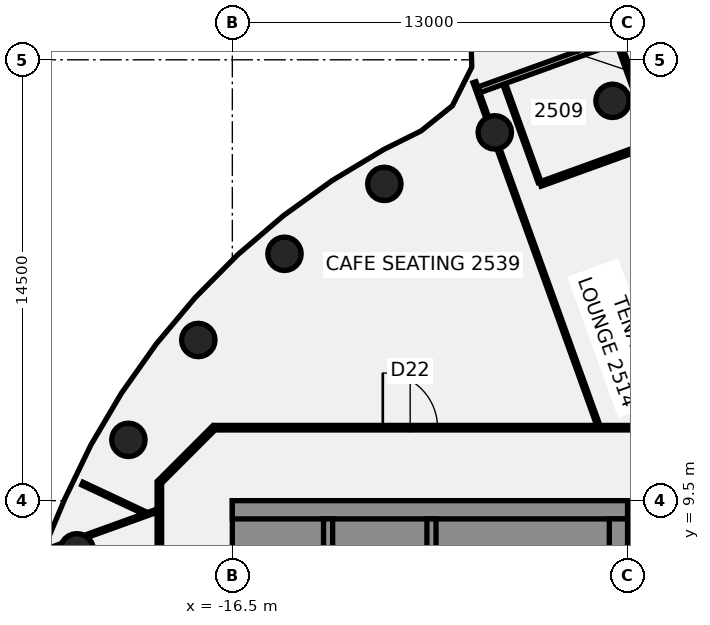
"""IFC4 building model, lengths in metres.
Left out: names, types, materials, properties, quantities, classifications, styles, units other than length and angle.
Written with IfcOpenShell. Run it as: python <this file> out.ifc"""

import sys

from ifc_helpers import new_model, si_unit, direction, frame, frame_2d, origin, origin_2d, place, context, subcontext, project, spatial, polyline, rectangle, circle, outline, extrude, element, fill, save


model = new_model("IFC4")
c1 = context("Model", 3, precision=1e-05, world=origin(), true_north=direction((0.0, 1.0)))
c2 = subcontext(c1, "Body", "Model", "MODEL_VIEW")
j1 = project(units=[si_unit("LENGTHUNIT", "METRE"), si_unit("PLANEANGLEUNIT", "RADIAN")], contexts=[c1])
p1 = place(None, origin())
s1 = spatial("IfcSite", under=j1, at=p1, CompositionType="ELEMENT")
p2 = place(p1, origin())
s2 = spatial("IfcBuilding", under=s1, at=p2, CompositionType="ELEMENT")
p3 = place(p2, frame((0.0, 0.0, 106.0)))
s3 = spatial("IfcBuildingStorey", under=s2, at=p3, CompositionType="ELEMENT", Elevation=106.0)
for number, where, z_axis, x_axis in (
    (1, (-3.994, 22.651, -0.14), (0.0, 0.0, 1.0), (1.0, 0.0, 0.0)),
    (2, (-7.866, 21.613, -0.14), (0.0, 0.0, 1.0), (1.0, 0.0, 0.0)),
    (3, (-11.5, 19.919, -0.14), (0.0, 0.0, 1.0), (1.0, 0.0, 0.0)),
    (4, (-14.784, 17.619, -0.14), (0.0, 0.0, 1.0), (1.0, 0.0, 0.0)),
    (5, (-17.619, 14.784, -0.14), (0.0, 0.0, 1.0), (1.0, 0.0, 0.0)),
    (6, (-19.919, 11.5, -0.14), (0.0, 0.0, 1.0), (1.0, 0.0, 0.0)),
    (7, (-21.613, 7.866, -0.14), (0.0, 0.0, 1.0), (1.0, 0.0, 0.0)),
):
    element("IfcColumn", number, at=place(p3, frame(where, z_axis=z_axis, x_axis=x_axis)), inside=s3, PredefinedType="COLUMN", context=c2, shape_type="SweptSolid", body=[
        extrude(circle(Radius=0.55, at=origin_2d()), origin(), (0.0, 0.0, 1.0), 3.75),
    ])
p4 = place(p3, frame((-8.536, 23.263, 0.0), z_axis=(0.0, 0.0, 1.0), x_axis=(0.339464068385, -0.940619022918, 0.0)))
e8 = element("IfcWall", 8, at=p4, inside=s3, PredefinedType="PARTITIONING", context=c2, shape_type="SweptSolid", body=[
    extrude(rectangle(XDim=1.23, YDim=0.1, at=frame_2d((0.615, 0.0))), origin(), (0.0, 0.0, 1.0), 3.01),
])
p5 = place(p3, frame((-7.749, 21.084, 0.0), z_axis=(0.0, 0.0, 1.0), x_axis=(0.339523661118, -0.940597514105, 0.0)))
e9 = element("IfcWall", 9, at=p5, inside=s3, PredefinedType="PARTITIONING", context=c2, shape_type="SweptSolid", body=[
    extrude(rectangle(XDim=9.684, YDim=0.1, at=frame_2d((4.842, 0.0))), origin(), (0.0, 0.0, 1.0), 3.01),
])
p6 = place(p3, frame((-7.558, 23.205, 0.0), z_axis=(0.0, 0.0, 1.0), x_axis=(0.339464028475, -0.940619037322, 0.0)))
e10 = element("IfcWall", 10, at=p6, inside=s3, PredefinedType="PARTITIONING", context=c2, shape_type="SweptSolid", body=[
    extrude(rectangle(XDim=3.425, YDim=0.1, at=frame_2d((1.712, 0.0))), origin(), (0.0, 0.0, 1.0), 3.01),
])
p7 = place(p3, frame((-5.449, 33.562, 0.0), z_axis=(0.0, 0.0, 1.0), x_axis=(0.339564331491, -0.940582832492, 0.0)))
e11 = element("IfcWall", 11, at=p7, inside=s3, PredefinedType="PARTITIONING", context=c2, shape_type="SweptSolid", body=[
    extrude(rectangle(XDim=11.305, YDim=0.15, at=frame_2d((5.653, 0.0))), origin(), (0.0, 0.0, 1.0), 3.01),
])
p8 = place(p7, frame((9.375, 0.0, 0.0)))
e12 = element("IfcOpeningElement", 12, at=p8, cuts=e11, PredefinedType="OPENING", context=c2, shape_type="SweptSolid", body=[
    extrude(rectangle(XDim=1.0, YDim=2.1, at=frame_2d((0.5, 1.05))), frame((0.0, 0.085, 0.0), z_axis=(0.0, -1.0, 0.0), x_axis=(1.0, 0.0, 0.0)), (0.0, 0.0, 1.0), 0.17),
])
p9 = place(p7, frame((5.175, 0.0, 0.0)))
e13 = element("IfcOpeningElement", 13, at=p9, cuts=e11, PredefinedType="OPENING", context=c2, shape_type="SweptSolid", body=[
    extrude(rectangle(XDim=0.9, YDim=2.1, at=frame_2d((0.45, 1.05))), frame((0.0, 0.085, 0.0), z_axis=(0.0, -1.0, 0.0), x_axis=(1.0, 0.0, 0.0)), (0.0, 0.0, 1.0), 0.17),
])
p10 = place(p3, frame((-3.796, 24.563, 0.0), z_axis=(0.0, 0.0, 1.0), x_axis=(0.339653221819, -0.94055073702, 0.0)))
e14 = element("IfcWall", 14, at=p10, inside=s3, PredefinedType="PARTITIONING", context=c2, shape_type="SweptSolid", body=[
    extrude(rectangle(XDim=3.425, YDim=0.15, at=frame_2d((1.712, 0.0))), origin(), (0.0, 0.0, 1.0), 3.01),
])
p11 = place(p10, frame((2.45, 0.0, 0.0)))
e15 = element("IfcOpeningElement", 15, at=p11, cuts=e14, PredefinedType="OPENING", context=c2, shape_type="SweptSolid", body=[
    extrude(rectangle(XDim=0.9, YDim=2.1, at=frame_2d((0.45, 1.05))), frame((0.0, 0.085, 0.0), z_axis=(0.0, -1.0, 0.0), x_axis=(1.0, 0.0, 0.0)), (0.0, 0.0, 1.0), 0.17),
])
p12 = place(p3, frame((-21.432, 10.061, 0.0), z_axis=(0.0, 0.0, 1.0), x_axis=(0.905202217212, -0.424981112467, 0.0)))
e16 = element("IfcWall", 16, at=p12, inside=s3, PredefinedType="PARTITIONING", context=c2, shape_type="SweptSolid", body=[
    extrude(rectangle(XDim=2.263, YDim=0.1, at=frame_2d((1.131, 0.0))), origin(), (0.0, 0.0, 1.0), 3.01),
])
p13 = place(p3, frame((-17.065, 11.9, 0.0), z_axis=(0.0, 0.0, 1.0), x_axis=(1.0, 0.0, 0.0)))
e17 = element("IfcWall", 17, at=p13, inside=s3, PredefinedType="PARTITIONING", context=c2, shape_type="SweptSolid", body=[
    extrude(rectangle(XDim=34.165, YDim=0.15, at=frame_2d((17.083, 0.0))), origin(), (0.0, 0.0, 1.0), 3.01),
])
p14 = place(p13, frame((19.797, 0.0, 0.0)))
e18 = element("IfcOpeningElement", 18, at=p14, cuts=e17, PredefinedType="OPENING", context=c2, shape_type="SweptSolid", body=[
    extrude(rectangle(XDim=1.8, YDim=2.1, at=frame_2d((0.9, 1.05))), frame((0.0, 0.085, 0.0), z_axis=(0.0, -1.0, 0.0), x_axis=(1.0, 0.0, 0.0)), (0.0, 0.0, 1.0), 0.17),
])
p15 = place(p13, frame((29.992, 0.0, 0.0)))
e19 = element("IfcOpeningElement", 19, at=p15, cuts=e17, PredefinedType="OPENING", context=c2, shape_type="SweptSolid", body=[
    extrude(rectangle(XDim=1.8, YDim=2.1, at=frame_2d((0.9, 1.05))), frame((0.0, 0.085, 0.0), z_axis=(0.0, -1.0, 0.0), x_axis=(1.0, 0.0, 0.0)), (0.0, 0.0, 1.0), 0.17),
])
p16 = place(p13, frame((5.515, 0.0, 0.0)))
e20 = element("IfcOpeningElement", 20, at=p16, cuts=e17, PredefinedType="OPENING", context=c2, shape_type="SweptSolid", body=[
    extrude(rectangle(XDim=1.8, YDim=2.1, at=frame_2d((0.9, 1.05))), frame((0.0, 0.085, 0.0), z_axis=(0.0, -1.0, 0.0), x_axis=(1.0, 0.0, 0.0)), (0.0, 0.0, 1.0), 0.17),
])
p17 = place(p3, frame((-22.415, 7.93, 0.0), z_axis=(0.0, 0.0, 1.0), x_axis=(0.940447136325, 0.339939970845, 0.0)))
e21 = element("IfcWall", 21, at=p17, inside=s3, PredefinedType="PARTITIONING", context=c2, shape_type="SweptSolid", body=[
    extrude(rectangle(XDim=0.304, YDim=0.1, at=frame_2d((0.152, 0.0))), origin(), (0.0, 0.0, 1.0), 3.01),
])
p18 = place(p3, frame((-21.31, 8.329, 0.0), z_axis=(0.0, 0.0, 1.0), x_axis=(0.94058618195, 0.339555053452, 0.0)))
e22 = element("IfcWall", 22, at=p18, inside=s3, PredefinedType="PARTITIONING", context=c2, shape_type="SweptSolid", body=[
    extrude(rectangle(XDim=2.483, YDim=0.1, at=frame_2d((1.241, 0.0))), origin(), (0.0, 0.0, 1.0), 3.01),
])
p19 = place(p3, frame((-8.387, 23.012, 0.0), z_axis=(0.0, 0.0, 1.0), x_axis=(0.94050598111, 0.339777132096, 0.0)))
e23 = element("IfcWall", 23, at=p19, inside=s3, PredefinedType="PARTITIONING", context=c2, shape_type="SweptSolid", body=[
    extrude(rectangle(XDim=14.244, YDim=0.2, at=frame_2d((7.122, 0.0))), origin(), (0.0, 0.0, 1.0), 3.01),
])
p20 = place(p19, frame((6.946, 0.0, 0.0)))
e24 = element("IfcOpeningElement", 24, at=p20, cuts=e23, PredefinedType="OPENING", context=c2, shape_type="SweptSolid", body=[
    extrude(rectangle(XDim=1.4, YDim=2.1, at=frame_2d((0.7, 1.05))), frame((0.0, 0.11, 0.0), z_axis=(0.0, -1.0, 0.0), x_axis=(1.0, 0.0, 0.0)), (0.0, 0.0, 1.0), 0.22),
])
p21 = place(p3, frame((-6.37, 19.913, 0.0), z_axis=(0.0, 0.0, 1.0), x_axis=(0.940654582455, 0.339365520503, 0.0)))
e25 = element("IfcWall", 25, at=p21, inside=s3, PredefinedType="PARTITIONING", context=c2, shape_type="SweptSolid", body=[
    extrude(rectangle(XDim=4.0, YDim=0.15, at=frame_2d((2.0, 0.0))), origin(), (0.0, 0.0, 1.0), 3.01),
])
p22 = place(p3, frame((-18.872, 10.128, 0.0), z_axis=(0.0, 0.0, 1.0), x_axis=(0.707106781187, 0.707106781187, 0.0)))
e26 = element("IfcWall", 26, at=p22, inside=s3, PredefinedType="PARTITIONING", context=c2, shape_type="SweptSolid", body=[
    extrude(rectangle(XDim=2.505, YDim=0.15, at=frame_2d((1.253, 0.0))), origin(), (0.0, 0.0, 1.0), 3.01),
])
p23 = place(p3, frame((-18.9, -10.1, 0.0), z_axis=(0.0, 0.0, 1.0), x_axis=(0.0, 1.0, 0.0)))
e27 = element("IfcWall", 27, at=p23, inside=s3, PredefinedType="PARTITIONING", context=c2, shape_type="SweptSolid", body=[
    extrude(rectangle(XDim=20.2, YDim=0.15, at=frame_2d((10.1, 0.0))), origin(), (0.0, 0.0, 1.0), 3.01),
])
p24 = place(p23, frame((9.554, 0.0, 0.0)))
e28 = element("IfcOpeningElement", 28, at=p24, cuts=e27, PredefinedType="OPENING", context=c2, shape_type="SweptSolid", body=[
    extrude(rectangle(XDim=1.8, YDim=2.1, at=frame_2d((0.9, 1.05))), frame((0.0, 0.085, 0.0), z_axis=(0.0, -1.0, 0.0), x_axis=(1.0, 0.0, 0.0)), (0.0, 0.0, 1.0), 0.17),
])
p25 = place(p23, frame((5.389, 0.0, 0.0)))
e29 = element("IfcOpeningElement", 29, at=p25, cuts=e27, PredefinedType="OPENING", context=c2, shape_type="SweptSolid", body=[
    extrude(rectangle(XDim=0.9, YDim=2.1, at=frame_2d((0.45, 1.05))), frame((0.0, 0.085, 0.0), z_axis=(0.0, -1.0, 0.0), x_axis=(1.0, 0.0, 0.0)), (0.0, 0.0, 1.0), 0.17),
])
p26 = place(p3, origin())
e30 = element("IfcWall", 30, at=p26, inside=s3, PredefinedType="SHEAR", context=c2, shape_type="SweptSolid", body=[
    extrude(outline(polyline([(-13.5, -8.9), (-13.5, -8.125), (-15.9, -8.125), (-15.9, -5.625), (-13.5, -5.625), (-13.5, -5.375), (-15.9, -5.375), (-15.9, -2.875), (-13.5, -2.875), (-13.5, -2.625), (-15.9, -2.625), (-15.9, -0.125), (-13.5, -0.125), (-13.5, 0.125), (-15.9, 0.125), (-15.9, 2.625), (-13.5, 2.625), (-13.5, 2.875), (-15.9, 2.875), (-15.9, 5.375), (-13.5, 5.375), (-13.5, 5.625), (-15.9, 5.625), (-15.9, 8.125), (-13.5, 8.125), (-13.5, 8.9), (-15.9, 8.9), (-16.5, 8.9), (-16.5, -8.9), (-15.9, -8.9), (-13.5, -8.9)])), origin(), (0.0, 0.0, 1.0), 3.61),
])
p27 = place(p3, frame((-16.5, 9.2, 0.0), z_axis=(0.0, 0.0, 1.0), x_axis=(1.0, 0.0, 0.0)))
e31 = element("IfcWall", 31, at=p27, inside=s3, PredefinedType="SHEAR", context=c2, shape_type="SweptSolid", body=[
    extrude(rectangle(XDim=13.0, YDim=0.6, at=frame_2d((6.5, 0.0))), origin(), (0.0, 0.0, 1.0), 3.61),
])
p28 = place(p3, origin())
e32 = element("IfcWall", 32, at=p28, inside=s3, PredefinedType="SHEAR", context=c2, shape_type="SweptSolid", body=[
    extrude(outline(polyline([(-9.8, -5.375), (-9.8, -5.625), (-7.5, -5.625), (-7.2, -5.625), (-7.2, 8.9), (-7.5, 8.9), (-9.8, 8.9), (-9.8, 8.125), (-7.5, 8.125), (-7.5, 5.625), (-9.8, 5.625), (-9.8, 5.375), (-7.5, 5.375), (-7.5, 2.875), (-9.8, 2.875), (-9.8, 2.625), (-7.5, 2.625), (-7.5, 0.125), (-9.8, 0.125), (-9.8, -0.125), (-7.5, -0.125), (-7.5, -2.625), (-9.8, -2.625), (-9.8, -2.875), (-7.5, -2.875), (-7.5, -5.375), (-9.8, -5.375)])), origin(), (0.0, 0.0, 1.0), 3.61),
])
p29 = place(p3, frame((-13.35, -8.9, 0.0), z_axis=(0.0, 0.0, 1.0), x_axis=(0.0, 1.0, 0.0)))
e33 = element("IfcWall", 33, at=p29, inside=s3, PredefinedType="SHEAR", context=c2, shape_type="SweptSolid", body=[
    extrude(rectangle(XDim=17.8, YDim=0.3, at=frame_2d((8.9, 0.0))), origin(), (0.0, 0.0, 1.0), 3.61),
])
p30 = place(p29, frame((1.325, 0.0, 0.0)))
e34 = element("IfcOpeningElement", 34, at=p30, cuts=e33, PredefinedType="OPENING", context=c2, shape_type="SweptSolid", body=[
    extrude(rectangle(XDim=1.4, YDim=2.1, at=frame_2d((0.7, 1.05))), frame((0.0, 0.16, 0.0), z_axis=(0.0, -1.0, 0.0), x_axis=(1.0, 0.0, 0.0)), (0.0, 0.0, 1.0), 0.32),
])
p31 = place(p29, frame((4.225, 0.0, 0.0)))
e35 = element("IfcOpeningElement", 35, at=p31, cuts=e33, PredefinedType="OPENING", context=c2, shape_type="SweptSolid", body=[
    extrude(rectangle(XDim=1.1, YDim=2.1, at=frame_2d((0.55, 1.05))), frame((0.0, 0.16, 0.0), z_axis=(0.0, -1.0, 0.0), x_axis=(1.0, 0.0, 0.0)), (0.0, 0.0, 1.0), 0.32),
])
p32 = place(p29, frame((6.975, 0.0, 0.0)))
e36 = element("IfcOpeningElement", 36, at=p32, cuts=e33, PredefinedType="OPENING", context=c2, shape_type="SweptSolid", body=[
    extrude(rectangle(XDim=1.1, YDim=2.1, at=frame_2d((0.55, 1.05))), frame((0.0, 0.16, 0.0), z_axis=(0.0, -1.0, 0.0), x_axis=(1.0, 0.0, 0.0)), (0.0, 0.0, 1.0), 0.32),
])
p33 = place(p29, frame((9.725, 0.0, 0.0)))
e37 = element("IfcOpeningElement", 37, at=p33, cuts=e33, PredefinedType="OPENING", context=c2, shape_type="SweptSolid", body=[
    extrude(rectangle(XDim=1.1, YDim=2.1, at=frame_2d((0.55, 1.05))), frame((0.0, 0.16, 0.0), z_axis=(0.0, -1.0, 0.0), x_axis=(1.0, 0.0, 0.0)), (0.0, 0.0, 1.0), 0.32),
])
p34 = place(p29, frame((12.475, 0.0, 0.0)))
e38 = element("IfcOpeningElement", 38, at=p34, cuts=e33, PredefinedType="OPENING", context=c2, shape_type="SweptSolid", body=[
    extrude(rectangle(XDim=1.1, YDim=2.1, at=frame_2d((0.55, 1.05))), frame((0.0, 0.16, 0.0), z_axis=(0.0, -1.0, 0.0), x_axis=(1.0, 0.0, 0.0)), (0.0, 0.0, 1.0), 0.32),
])
p35 = place(p3, frame((-9.95, -8.9, 0.0), z_axis=(0.0, 0.0, 1.0), x_axis=(0.0, 1.0, 0.0)))
e39 = element("IfcWall", 39, at=p35, inside=s3, PredefinedType="SHEAR", context=c2, shape_type="SweptSolid", body=[
    extrude(rectangle(XDim=17.8, YDim=0.3, at=frame_2d((8.9, 0.0))), origin(), (0.0, 0.0, 1.0), 3.61),
])
p36 = place(p3, frame((-3.8, -8.9, 0.0), z_axis=(0.0, 0.0, 1.0), x_axis=(0.0, 1.0, 0.0)))
e40 = element("IfcWall", 40, at=p36, inside=s3, PredefinedType="SHEAR", context=c2, shape_type="SweptSolid", body=[
    extrude(rectangle(XDim=17.8, YDim=0.6, at=frame_2d((8.9, 0.0))), origin(), (0.0, 0.0, 1.0), 3.61),
])
p37 = place(p36, frame((1.25, 0.0, 0.0)))
e41 = element("IfcOpeningElement", 41, at=p37, cuts=e40, PredefinedType="OPENING", context=c2, shape_type="SweptSolid", body=[
    extrude(rectangle(XDim=1.8, YDim=2.1, at=frame_2d((0.9, 1.05))), frame((0.0, 0.31, 0.0), z_axis=(0.0, -1.0, 0.0), x_axis=(1.0, 0.0, 0.0)), (0.0, 0.0, 1.0), 0.62),
])
p38 = place(p36, frame((13.8, 0.0, 0.0)))
e42 = element("IfcOpeningElement", 42, at=p38, cuts=e40, PredefinedType="OPENING", context=c2, shape_type="SweptSolid", body=[
    extrude(rectangle(XDim=1.0, YDim=2.1, at=frame_2d((0.5, 1.05))), frame((0.0, 0.31, 0.0), z_axis=(0.0, -1.0, 0.0), x_axis=(1.0, 0.0, 0.0)), (0.0, 0.0, 1.0), 0.62),
])
p39 = place(p16, origin())
e43 = element("IfcDoor", 43, at=p39, inside=s3, OperationType="DOUBLE_DOOR_SINGLE_SWING", PredefinedType="DOOR", context=c2, shape_type="SweptSolid", body=[
    extrude(rectangle(XDim=1.8, YDim=2.1, at=frame_2d((0.9, 1.05))), frame((0.0, 0.025, 0.0), z_axis=(0.0, -1.0, 0.0), x_axis=(1.0, 0.0, 0.0)), (0.0, 0.0, 1.0), 0.05),
])
fill(e20, e43)
save(model, sys.argv[1])
